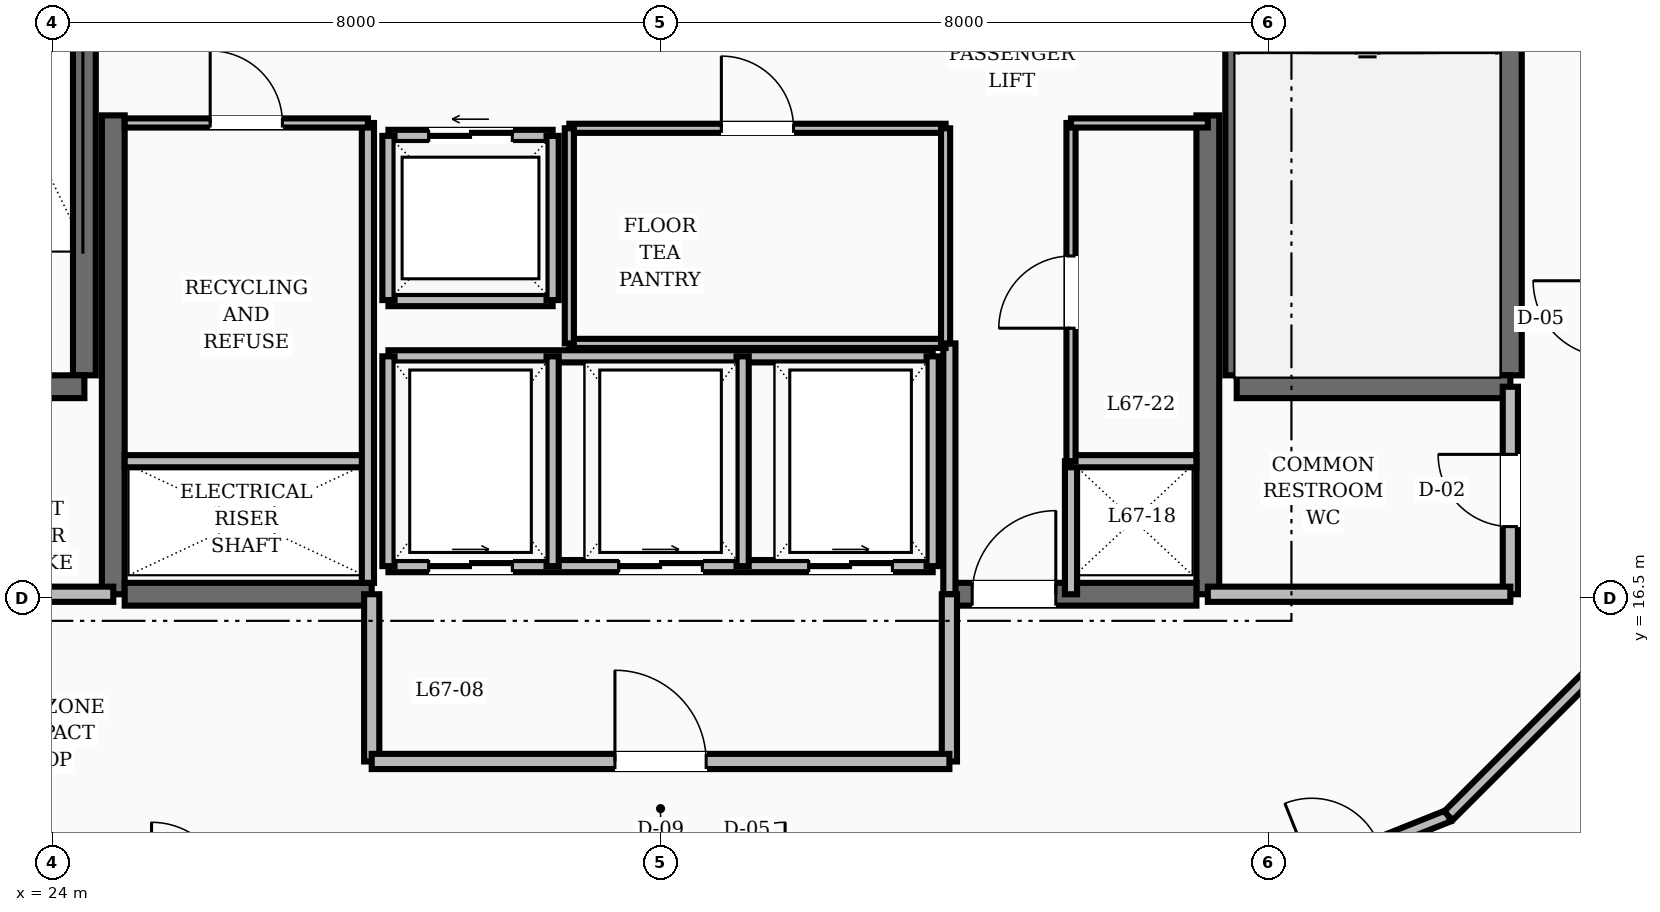
"""IFC4 building model, lengths in metres.
Left out: names, types, materials, properties, quantities, classifications, styles, units other than length and angle.
Written with IfcOpenShell. Run it as: python <this file> out.ifc"""

import sys

from ifc_helpers import new_model, si_unit, direction, frame, frame_2d, origin, place, context, subcontext, project, spatial, rectangle, extrude, element, fill, save


model = new_model("IFC4")
c1 = context("Model", 3, precision=1e-05, world=origin(), true_north=direction((0.0, 1.0)))
c2 = subcontext(c1, "Body", "Model", "MODEL_VIEW")
j1 = project(units=[si_unit("LENGTHUNIT", "METRE"), si_unit("PLANEANGLEUNIT", "RADIAN")], contexts=[c1])
p1 = place(None, origin())
s1 = spatial("IfcSite", under=j1, at=p1, CompositionType="ELEMENT")
p2 = place(p1, origin())
s2 = spatial("IfcBuilding", under=s1, at=p2, CompositionType="ELEMENT")
p3 = place(p2, frame((0.0, 0.0, 258.0)))
s3 = spatial("IfcBuildingStorey", under=s2, at=p3, CompositionType="ELEMENT", Elevation=258.0)
for number, where, z_axis, x_axis in (
    (1, (24.8, 16.55, 0.0), (0.0, 0.0, 1.0), (0.0, 1.0, 0.0)),
    (2, (39.2, 16.55, 0.0), (0.0, 0.0, 1.0), (0.0, 1.0, 0.0)),
):
    element("IfcWall", number, at=place(p3, frame(where, z_axis=z_axis, x_axis=x_axis)), inside=s3, PredefinedType="SHEAR", context=c2, shape_type="SweptSolid", body=[
        extrude(rectangle(XDim=6.3, YDim=0.3, at=frame_2d((3.15, 0.0))), origin(), (0.0, 0.0, 1.0), 3.6),
    ])
p4 = place(p3, frame((24.95, 16.55, 0.0), z_axis=(0.0, 0.0, 1.0), x_axis=(1.0, 0.0, 0.0)))
e3 = element("IfcWall", 3, at=p4, inside=s3, PredefinedType="SHEAR", context=c2, shape_type="SweptSolid", body=[
    extrude(rectangle(XDim=3.25, YDim=0.3, at=frame_2d((1.625, 0.0))), origin(), (0.0, 0.0, 1.0), 3.6),
])
p5 = place(p3, frame((35.8, 16.55, 0.0), z_axis=(0.0, 0.0, 1.0), x_axis=(1.0, 0.0, 0.0)))
e4 = element("IfcWall", 4, at=p5, inside=s3, PredefinedType="SHEAR", context=c2, shape_type="SweptSolid", body=[
    extrude(rectangle(XDim=3.25, YDim=0.3, at=frame_2d((1.625, 0.0))), origin(), (0.0, 0.0, 1.0), 3.6),
])
p6 = place(p5, frame((0.3, 0.0, 0.0)))
e5 = element("IfcOpeningElement", 5, at=p6, cuts=e4, PredefinedType="OPENING", context=c2, shape_type="SweptSolid", body=[
    extrude(rectangle(XDim=1.1, YDim=2.1, at=frame_2d((0.55, 1.05))), frame((0.0, 0.16, 0.0), z_axis=(0.0, -1.0, 0.0), x_axis=(1.0, 0.0, 0.0)), (0.0, 0.0, 1.0), 0.32),
])
p7 = place(p3, frame((24.42, 19.43, 0.0), z_axis=(0.0, 0.0, 1.0), x_axis=(0.0, 1.0, 0.0)))
e6 = element("IfcWall", 6, at=p7, inside=s3, PredefinedType="SHEAR", context=c2, shape_type="SweptSolid", body=[
    extrude(rectangle(XDim=8.74, YDim=0.3, at=frame_2d((4.37, 0.0))), origin(), (0.0, 0.0, 1.0), 3.6),
])
p8 = place(p3, frame((20.82, 19.28, 0.0), z_axis=(0.0, 0.0, 1.0), x_axis=(1.0, 0.0, 0.0)))
e7 = element("IfcWall", 7, at=p8, inside=s3, PredefinedType="SHEAR", context=c2, shape_type="SweptSolid", body=[
    extrude(rectangle(XDim=3.6, YDim=0.3, at=frame_2d((1.8, 0.0))), origin(), (0.0, 0.0, 1.0), 3.6),
])
p9 = place(p8, frame((1.3, 0.0, 0.0)))
e8 = element("IfcOpeningElement", 8, at=p9, cuts=e7, PredefinedType="OPENING", context=c2, shape_type="SweptSolid", body=[
    extrude(rectangle(XDim=1.1, YDim=2.1, at=frame_2d((0.55, 1.05))), frame((0.0, 0.16, 0.0), z_axis=(0.0, -1.0, 0.0), x_axis=(1.0, 0.0, 0.0)), (0.0, 0.0, 1.0), 0.32),
])
for number, where, z_axis, x_axis in (
    (9, (43.18, 19.43, 0.0), (0.0, 0.0, 1.0), (0.0, 1.0, 0.0)),
    (10, (39.58, 19.43, 0.0), (0.0, 0.0, 1.0), (0.0, 1.0, 0.0)),
):
    element("IfcWall", number, at=place(p3, frame(where, z_axis=z_axis, x_axis=x_axis)), inside=s3, PredefinedType="SHEAR", context=c2, shape_type="SweptSolid", body=[
        extrude(rectangle(XDim=8.74, YDim=0.3, at=frame_2d((4.37, 0.0))), origin(), (0.0, 0.0, 1.0), 3.6),
    ])
p10 = place(p3, frame((39.58, 19.28, 0.0), z_axis=(0.0, 0.0, 1.0), x_axis=(1.0, 0.0, 0.0)))
e11 = element("IfcWall", 11, at=p10, inside=s3, PredefinedType="SHEAR", context=c2, shape_type="SweptSolid", body=[
    extrude(rectangle(XDim=3.6, YDim=0.3, at=frame_2d((1.8, 0.0))), origin(), (0.0, 0.0, 1.0), 3.6),
])
p11 = place(p3, frame((20.82, 16.55, 0.0), z_axis=(0.0, 0.0, 1.0), x_axis=(1.0, 0.0, 0.0)))
e12 = element("IfcWall", 12, at=p11, inside=s3, PredefinedType="SOLIDWALL", context=c2, shape_type="SweptSolid", body=[
    extrude(rectangle(XDim=3.98, YDim=0.2, at=frame_2d((1.99, 0.0))), origin(), (0.0, 0.0, 1.0), 2.87),
])
p12 = place(p3, frame((43.18, 16.55, 0.0), z_axis=(0.0, 0.0, 1.0), x_axis=(0.0, 1.0, 0.0)))
e13 = element("IfcWall", 13, at=p12, inside=s3, PredefinedType="SOLIDWALL", context=c2, shape_type="SweptSolid", body=[
    extrude(rectangle(XDim=2.73, YDim=0.2, at=frame_2d((1.365, 0.0))), origin(), (0.0, 0.0, 1.0), 2.87),
])
p13 = place(p12, frame((0.89, 0.0, 0.0)))
e14 = element("IfcOpeningElement", 14, at=p13, cuts=e13, PredefinedType="OPENING", context=c2, shape_type="SweptSolid", body=[
    extrude(rectangle(XDim=0.95, YDim=2.1, at=frame_2d((0.475, 1.05))), frame((0.0, 0.11, 0.0), z_axis=(0.0, -1.0, 0.0), x_axis=(1.0, 0.0, 0.0)), (0.0, 0.0, 1.0), 0.22),
])
p14 = place(p3, frame((39.2, 16.55, 0.0), z_axis=(0.0, 0.0, 1.0), x_axis=(1.0, 0.0, 0.0)))
e15 = element("IfcWall", 15, at=p14, inside=s3, PredefinedType="SOLIDWALL", context=c2, shape_type="SweptSolid", body=[
    extrude(rectangle(XDim=3.98, YDim=0.2, at=frame_2d((1.99, 0.0))), origin(), (0.0, 0.0, 1.0), 2.87),
])
p15 = place(p3, frame((35.8, 16.55, 0.0), z_axis=(0.0, 0.0, 1.0), x_axis=(0.0, 1.0, 0.0)))
e16 = element("IfcWall", 16, at=p15, inside=s3, PredefinedType="SOLIDWALL", context=c2, shape_type="SweptSolid", body=[
    extrude(rectangle(XDim=3.3, YDim=0.16, at=frame_2d((1.65, 0.0))), origin(), (0.0, 0.0, 1.0), 2.87),
])
p16 = place(p3, frame((37.4, 16.55, 0.0), z_axis=(0.0, 0.0, 1.0), x_axis=(0.0, 1.0, 0.0)))
e17 = element("IfcWall", 17, at=p16, inside=s3, PredefinedType="SOLIDWALL", context=c2, shape_type="SweptSolid", body=[
    extrude(rectangle(XDim=1.75, YDim=0.16, at=frame_2d((0.875, 0.0))), origin(), (0.0, 0.0, 1.0), 2.87),
])
for number, where, z_axis, x_axis in (
    (18, (28.2, 14.35, 0.0), (0.0, 0.0, 1.0), (0.0, 1.0, 0.0)),
    (19, (35.8, 14.35, 0.0), (0.0, 0.0, 1.0), (0.0, 1.0, 0.0)),
):
    element("IfcWall", number, at=place(p3, frame(where, z_axis=z_axis, x_axis=x_axis)), inside=s3, PredefinedType="SOLIDWALL", context=c2, shape_type="SweptSolid", body=[
        extrude(rectangle(XDim=2.2, YDim=0.2, at=frame_2d((1.1, 0.0))), origin(), (0.0, 0.0, 1.0), 2.87),
    ])
p17 = place(p3, frame((28.2, 14.35, 0.0), z_axis=(0.0, 0.0, 1.0), x_axis=(1.0, 0.0, 0.0)))
e20 = element("IfcWall", 20, at=p17, inside=s3, PredefinedType="SOLIDWALL", context=c2, shape_type="SweptSolid", body=[
    extrude(rectangle(XDim=7.6, YDim=0.2, at=frame_2d((3.8, 0.0))), origin(), (0.0, 0.0, 1.0), 2.87),
])
p18 = place(p17, frame((3.2, 0.0, 0.0)))
e21 = element("IfcOpeningElement", 21, at=p18, cuts=e20, PredefinedType="OPENING", context=c2, shape_type="SweptSolid", body=[
    extrude(rectangle(XDim=1.2, YDim=2.1, at=frame_2d((0.6, 1.05))), frame((0.0, 0.11, 0.0), z_axis=(0.0, -1.0, 0.0), x_axis=(1.0, 0.0, 0.0)), (0.0, 0.0, 1.0), 0.22),
])
p19 = place(p3, frame((28.42, 22.58, 0.0), z_axis=(0.0, 0.0, 1.0), x_axis=(1.0, 0.0, 0.0)))
e22 = element("IfcWall", 22, at=p19, inside=s3, PredefinedType="SOLIDWALL", context=c2, shape_type="SweptSolid", body=[
    extrude(rectangle(XDim=2.16, YDim=0.16, at=frame_2d((1.08, 0.0))), origin(), (0.0, 0.0, 1.0), 2.87),
])
p20 = place(p19, frame((0.53, 0.0, 0.0)))
e23 = element("IfcOpeningElement", 23, at=p20, cuts=e22, PredefinedType="OPENING", context=c2, shape_type="SweptSolid", body=[
    extrude(rectangle(XDim=1.1, YDim=2.15, at=frame_2d((0.55, 1.075))), frame((0.0, 0.09, 0.0), z_axis=(0.0, -1.0, 0.0), x_axis=(1.0, 0.0, 0.0)), (0.0, 0.0, 1.0), 0.18),
])
for number, where, z_axis, x_axis in (
    (24, (28.42, 20.42, 0.0), (0.0, 0.0, 1.0), (1.0, 0.0, 0.0)),
    (25, (28.42, 20.42, 0.0), (0.0, 0.0, 1.0), (0.0, 1.0, 0.0)),
    (26, (30.58, 20.42, 0.0), (0.0, 0.0, 1.0), (0.0, 1.0, 0.0)),
):
    element("IfcWall", number, at=place(p3, frame(where, z_axis=z_axis, x_axis=x_axis)), inside=s3, PredefinedType="SOLIDWALL", context=c2, shape_type="SweptSolid", body=[
        extrude(rectangle(XDim=2.16, YDim=0.16, at=frame_2d((1.08, 0.0))), origin(), (0.0, 0.0, 1.0), 2.87),
    ])
p21 = place(p3, frame((28.42, 16.92, 0.0), z_axis=(0.0, 0.0, 1.0), x_axis=(1.0, 0.0, 0.0)))
e27 = element("IfcWall", 27, at=p21, inside=s3, PredefinedType="SOLIDWALL", context=c2, shape_type="SweptSolid", body=[
    extrude(rectangle(XDim=7.16, YDim=0.16, at=frame_2d((3.58, 0.0))), origin(), (0.0, 0.0, 1.0), 2.87),
])
p22 = place(p21, frame((0.53, 0.0, 0.0)))
e28 = element("IfcOpeningElement", 28, at=p22, cuts=e27, PredefinedType="OPENING", context=c2, shape_type="SweptSolid", body=[
    extrude(rectangle(XDim=1.1, YDim=2.15, at=frame_2d((0.55, 1.075))), frame((0.0, 0.09, 0.0), z_axis=(0.0, -1.0, 0.0), x_axis=(1.0, 0.0, 0.0)), (0.0, 0.0, 1.0), 0.18),
])
p23 = place(p21, frame((3.03, 0.0, 0.0)))
e29 = element("IfcOpeningElement", 29, at=p23, cuts=e27, PredefinedType="OPENING", context=c2, shape_type="SweptSolid", body=[
    extrude(rectangle(XDim=1.1, YDim=2.15, at=frame_2d((0.55, 1.075))), frame((0.0, 0.09, 0.0), z_axis=(0.0, -1.0, 0.0), x_axis=(1.0, 0.0, 0.0)), (0.0, 0.0, 1.0), 0.18),
])
p24 = place(p21, frame((5.53, 0.0, 0.0)))
e30 = element("IfcOpeningElement", 30, at=p24, cuts=e27, PredefinedType="OPENING", context=c2, shape_type="SweptSolid", body=[
    extrude(rectangle(XDim=1.1, YDim=2.15, at=frame_2d((0.55, 1.075))), frame((0.0, 0.09, 0.0), z_axis=(0.0, -1.0, 0.0), x_axis=(1.0, 0.0, 0.0)), (0.0, 0.0, 1.0), 0.18),
])
p25 = place(p3, frame((28.42, 19.68, 0.0), z_axis=(0.0, 0.0, 1.0), x_axis=(1.0, 0.0, 0.0)))
e31 = element("IfcWall", 31, at=p25, inside=s3, PredefinedType="SOLIDWALL", context=c2, shape_type="SweptSolid", body=[
    extrude(rectangle(XDim=7.16, YDim=0.16, at=frame_2d((3.58, 0.0))), origin(), (0.0, 0.0, 1.0), 2.87),
])
for number, where, z_axis, x_axis in (
    (32, (28.42, 16.92, 0.0), (0.0, 0.0, 1.0), (0.0, 1.0, 0.0)),
    (33, (30.58, 16.92, 0.0), (0.0, 0.0, 1.0), (0.0, 1.0, 0.0)),
    (34, (33.08, 16.92, 0.0), (0.0, 0.0, 1.0), (0.0, 1.0, 0.0)),
    (35, (35.58, 16.92, 0.0), (0.0, 0.0, 1.0), (0.0, 1.0, 0.0)),
):
    element("IfcWall", number, at=place(p3, frame(where, z_axis=z_axis, x_axis=x_axis)), inside=s3, PredefinedType="SOLIDWALL", context=c2, shape_type="SweptSolid", body=[
        extrude(rectangle(XDim=2.76, YDim=0.16, at=frame_2d((1.38, 0.0))), origin(), (0.0, 0.0, 1.0), 2.87),
    ])
p26 = place(p3, frame((30.8, 22.68, 0.0), z_axis=(0.0, 0.0, 1.0), x_axis=(1.0, 0.0, 0.0)))
e36 = element("IfcWall", 36, at=p26, inside=s3, PredefinedType="PARTITIONING", context=c2, shape_type="SweptSolid", body=[
    extrude(rectangle(XDim=4.95, YDim=0.12, at=frame_2d((2.475, 0.0))), origin(), (0.0, 0.0, 1.0), 2.87),
])
p27 = place(p26, frame((2.0, 0.0, 0.0)))
e37 = element("IfcOpeningElement", 37, at=p27, cuts=e36, PredefinedType="OPENING", context=c2, shape_type="SweptSolid", body=[
    extrude(rectangle(XDim=0.95, YDim=2.1, at=frame_2d((0.475, 1.05))), frame((0.0, 0.07, 0.0), z_axis=(0.0, -1.0, 0.0), x_axis=(1.0, 0.0, 0.0)), (0.0, 0.0, 1.0), 0.14),
])
p28 = place(p3, frame((30.8, 19.85, 0.0), z_axis=(0.0, 0.0, 1.0), x_axis=(1.0, 0.0, 0.0)))
e38 = element("IfcWall", 38, at=p28, inside=s3, PredefinedType="PARTITIONING", context=c2, shape_type="SweptSolid", body=[
    extrude(rectangle(XDim=4.95, YDim=0.12, at=frame_2d((2.475, 0.0))), origin(), (0.0, 0.0, 1.0), 2.87),
])
for number, where, z_axis, x_axis in (
    (39, (30.8, 19.85, 0.0), (0.0, 0.0, 1.0), (0.0, 1.0, 0.0)),
    (40, (35.75, 19.85, 0.0), (0.0, 0.0, 1.0), (0.0, 1.0, 0.0)),
):
    element("IfcWall", number, at=place(p3, frame(where, z_axis=z_axis, x_axis=x_axis)), inside=s3, PredefinedType="PARTITIONING", context=c2, shape_type="SweptSolid", body=[
        extrude(rectangle(XDim=2.83, YDim=0.12, at=frame_2d((1.415, 0.0))), origin(), (0.0, 0.0, 1.0), 2.87),
    ])
p29 = place(p3, frame((24.95, 18.3, 0.0), z_axis=(0.0, 0.0, 1.0), x_axis=(1.0, 0.0, 0.0)))
e41 = element("IfcWall", 41, at=p29, inside=s3, PredefinedType="SOLIDWALL", context=c2, shape_type="SweptSolid", body=[
    extrude(rectangle(XDim=3.2, YDim=0.16, at=frame_2d((1.6, 0.0))), origin(), (0.0, 0.0, 1.0), 2.87),
])
p30 = place(p3, frame((28.15, 16.7, 0.0), z_axis=(0.0, 0.0, 1.0), x_axis=(0.0, 1.0, 0.0)))
e42 = element("IfcWall", 42, at=p30, inside=s3, PredefinedType="SOLIDWALL", context=c2, shape_type="SweptSolid", body=[
    extrude(rectangle(XDim=6.05, YDim=0.16, at=frame_2d((3.025, 0.0))), origin(), (0.0, 0.0, 1.0), 2.87),
])
p31 = place(p3, frame((37.4, 18.3, 0.0), z_axis=(0.0, 0.0, 1.0), x_axis=(1.0, 0.0, 0.0)))
e43 = element("IfcWall", 43, at=p31, inside=s3, PredefinedType="SOLIDWALL", context=c2, shape_type="SweptSolid", body=[
    extrude(rectangle(XDim=1.65, YDim=0.16, at=frame_2d((0.825, 0.0))), origin(), (0.0, 0.0, 1.0), 2.87),
])
p32 = place(p3, frame((24.95, 22.75, 0.0), z_axis=(0.0, 0.0, 1.0), x_axis=(1.0, 0.0, 0.0)))
e44 = element("IfcWall", 44, at=p32, inside=s3, PredefinedType="PARTITIONING", context=c2, shape_type="SweptSolid", body=[
    extrude(rectangle(XDim=3.2, YDim=0.12, at=frame_2d((1.6, 0.0))), origin(), (0.0, 0.0, 1.0), 2.87),
])
p33 = place(p32, frame((1.125, 0.0, 0.0)))
e45 = element("IfcOpeningElement", 45, at=p33, cuts=e44, PredefinedType="OPENING", context=c2, shape_type="SweptSolid", body=[
    extrude(rectangle(XDim=0.95, YDim=2.1, at=frame_2d((0.475, 1.05))), frame((0.0, 0.07, 0.0), z_axis=(0.0, -1.0, 0.0), x_axis=(1.0, 0.0, 0.0)), (0.0, 0.0, 1.0), 0.14),
])
p34 = place(p3, frame((37.4, 18.3, 0.0), z_axis=(0.0, 0.0, 1.0), x_axis=(0.0, 1.0, 0.0)))
e46 = element("IfcWall", 46, at=p34, inside=s3, PredefinedType="PARTITIONING", context=c2, shape_type="SweptSolid", body=[
    extrude(rectangle(XDim=4.45, YDim=0.12, at=frame_2d((2.225, 0.0))), origin(), (0.0, 0.0, 1.0), 2.87),
])
p35 = place(p34, frame((1.75, 0.0, 0.0)))
e47 = element("IfcOpeningElement", 47, at=p35, cuts=e46, PredefinedType="OPENING", context=c2, shape_type="SweptSolid", body=[
    extrude(rectangle(XDim=0.95, YDim=2.1, at=frame_2d((0.475, 1.05))), frame((0.0, 0.07, 0.0), z_axis=(0.0, -1.0, 0.0), x_axis=(1.0, 0.0, 0.0)), (0.0, 0.0, 1.0), 0.14),
])
p36 = place(p3, frame((37.4, 22.75, 0.0), z_axis=(0.0, 0.0, 1.0), x_axis=(1.0, 0.0, 0.0)))
e48 = element("IfcWall", 48, at=p36, inside=s3, PredefinedType="PARTITIONING", context=c2, shape_type="SweptSolid", body=[
    extrude(rectangle(XDim=1.8, YDim=0.12, at=frame_2d((0.9, 0.0))), origin(), (0.0, 0.0, 1.0), 2.87),
])
p37 = place(p3, frame((21.635, 13.635, 0.0), z_axis=(0.0, 0.0, 1.0), x_axis=(0.92856882165, -0.371160266542, 0.0)))
e49 = element("IfcWall", 49, at=p37, inside=s3, PredefinedType="SOLIDWALL", context=c2, shape_type="SweptSolid", body=[
    extrude(rectangle(XDim=2.923, YDim=0.16, at=frame_2d((1.461, 0.0))), origin(), (0.0, 0.0, 1.0), 2.87),
])
p38 = place(p3, frame((39.651, 12.55, 0.0), z_axis=(0.0, 0.0, 1.0), x_axis=(0.92856882165, 0.371160266542, 0.0)))
e50 = element("IfcWall", 50, at=p38, inside=s3, PredefinedType="SOLIDWALL", context=c2, shape_type="SweptSolid", body=[
    extrude(rectangle(XDim=2.923, YDim=0.16, at=frame_2d((1.461, 0.0))), origin(), (0.0, 0.0, 1.0), 2.87),
])
p39 = place(p38, frame((0.987, 0.0, 0.0)))
e51 = element("IfcOpeningElement", 51, at=p39, cuts=e50, PredefinedType="OPENING", context=c2, shape_type="SweptSolid", body=[
    extrude(rectangle(XDim=0.95, YDim=2.1, at=frame_2d((0.475, 1.05))), frame((0.0, 0.09, 0.0), z_axis=(0.0, -1.0, 0.0), x_axis=(1.0, 0.0, 0.0)), (0.0, 0.0, 1.0), 0.18),
])
p40 = place(p3, frame((42.365, 13.635, 0.0), z_axis=(0.0, 0.0, 1.0), x_axis=(0.707106781187, 0.707106781187, 0.0)))
e52 = element("IfcWall", 52, at=p40, inside=s3, PredefinedType="SOLIDWALL", context=c2, shape_type="SweptSolid", body=[
    extrude(rectangle(XDim=2.916, YDim=0.16, at=frame_2d((1.458, 0.0))), origin(), (0.0, 0.0, 1.0), 2.87),
])
p41 = place(p13, origin())
e53 = element("IfcDoor", 53, at=p41, inside=s3, OperationType="SINGLE_SWING_RIGHT", PredefinedType="DOOR", context=c2, shape_type="SweptSolid", body=[
    extrude(rectangle(XDim=0.95, YDim=2.1, at=frame_2d((0.475, 1.05))), frame((0.0, 0.025, 0.0), z_axis=(0.0, -1.0, 0.0), x_axis=(1.0, 0.0, 0.0)), (0.0, 0.0, 1.0), 0.05),
])
fill(e14, e53)
p42 = place(p6, origin())
e54 = element("IfcDoor", 54, at=p42, inside=s3, OperationType="SINGLE_SWING_RIGHT", PredefinedType="DOOR", context=c2, shape_type="SweptSolid", body=[
    extrude(rectangle(XDim=1.1, YDim=2.1, at=frame_2d((0.55, 1.05))), frame((0.0, 0.025, 0.0), z_axis=(0.0, -1.0, 0.0), x_axis=(1.0, 0.0, 0.0)), (0.0, 0.0, 1.0), 0.05),
])
fill(e5, e54)
p43 = place(p18, origin())
e55 = element("IfcDoor", 55, at=p43, inside=s3, OperationType="SINGLE_SWING_LEFT", PredefinedType="DOOR", context=c2, shape_type="SweptSolid", body=[
    extrude(rectangle(XDim=1.2, YDim=2.1, at=frame_2d((0.6, 1.05))), frame((0.0, 0.025, 0.0), z_axis=(0.0, -1.0, 0.0), x_axis=(1.0, 0.0, 0.0)), (0.0, 0.0, 1.0), 0.05),
])
fill(e21, e55)
p44 = place(p20, origin())
e56 = element("IfcDoor", 56, at=p44, inside=s3, OperationType="SLIDING_TO_LEFT", PredefinedType="DOOR", context=c2, shape_type="SweptSolid", body=[
    extrude(rectangle(XDim=1.1, YDim=2.15, at=frame_2d((0.55, 1.075))), frame((0.0, 0.025, 0.0), z_axis=(0.0, -1.0, 0.0), x_axis=(1.0, 0.0, 0.0)), (0.0, 0.0, 1.0), 0.05),
])
fill(e23, e56)
p45 = place(p22, origin())
e57 = element("IfcDoor", 57, at=p45, inside=s3, OperationType="SLIDING_TO_RIGHT", PredefinedType="DOOR", context=c2, shape_type="SweptSolid", body=[
    extrude(rectangle(XDim=1.1, YDim=2.15, at=frame_2d((0.55, 1.075))), frame((0.0, 0.025, 0.0), z_axis=(0.0, -1.0, 0.0), x_axis=(1.0, 0.0, 0.0)), (0.0, 0.0, 1.0), 0.05),
])
fill(e28, e57)
p46 = place(p23, origin())
e58 = element("IfcDoor", 58, at=p46, inside=s3, OperationType="SLIDING_TO_RIGHT", PredefinedType="DOOR", context=c2, shape_type="SweptSolid", body=[
    extrude(rectangle(XDim=1.1, YDim=2.15, at=frame_2d((0.55, 1.075))), frame((0.0, 0.025, 0.0), z_axis=(0.0, -1.0, 0.0), x_axis=(1.0, 0.0, 0.0)), (0.0, 0.0, 1.0), 0.05),
])
fill(e29, e58)
p47 = place(p24, origin())
e59 = element("IfcDoor", 59, at=p47, inside=s3, OperationType="SLIDING_TO_RIGHT", PredefinedType="DOOR", context=c2, shape_type="SweptSolid", body=[
    extrude(rectangle(XDim=1.1, YDim=2.15, at=frame_2d((0.55, 1.075))), frame((0.0, 0.025, 0.0), z_axis=(0.0, -1.0, 0.0), x_axis=(1.0, 0.0, 0.0)), (0.0, 0.0, 1.0), 0.05),
])
fill(e30, e59)
p48 = place(p27, origin())
e60 = element("IfcDoor", 60, at=p48, inside=s3, OperationType="SINGLE_SWING_LEFT", PredefinedType="DOOR", context=c2, shape_type="SweptSolid", body=[
    extrude(rectangle(XDim=0.95, YDim=2.1, at=frame_2d((0.475, 1.05))), frame((0.0, 0.025, 0.0), z_axis=(0.0, -1.0, 0.0), x_axis=(1.0, 0.0, 0.0)), (0.0, 0.0, 1.0), 0.05),
])
fill(e37, e60)
p49 = place(p33, origin())
e61 = element("IfcDoor", 61, at=p49, inside=s3, OperationType="SINGLE_SWING_LEFT", PredefinedType="DOOR", context=c2, shape_type="SweptSolid", body=[
    extrude(rectangle(XDim=0.95, YDim=2.1, at=frame_2d((0.475, 1.05))), frame((0.0, 0.025, 0.0), z_axis=(0.0, -1.0, 0.0), x_axis=(1.0, 0.0, 0.0)), (0.0, 0.0, 1.0), 0.05),
])
fill(e45, e61)
p50 = place(p35, origin())
e62 = element("IfcDoor", 62, at=p50, inside=s3, OperationType="SINGLE_SWING_LEFT", PredefinedType="DOOR", context=c2, shape_type="SweptSolid", body=[
    extrude(rectangle(XDim=0.95, YDim=2.1, at=frame_2d((0.475, 1.05))), frame((0.0, 0.025, 0.0), z_axis=(0.0, -1.0, 0.0), x_axis=(1.0, 0.0, 0.0)), (0.0, 0.0, 1.0), 0.05),
])
fill(e47, e62)
save(model, sys.argv[1])
